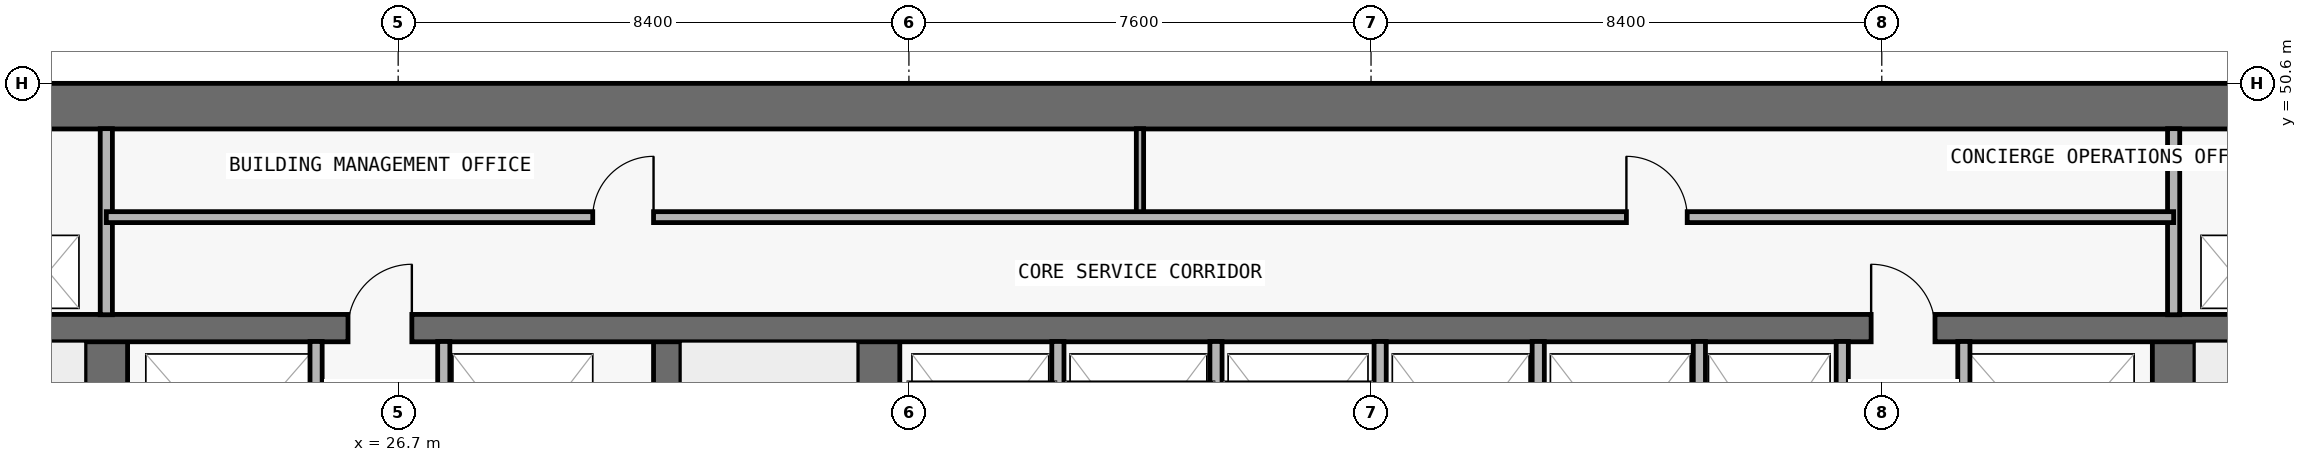
"""IFC4 building model, lengths in metres.
Left out: names, types, materials, properties, quantities, classifications, styles, units other than length and angle.
Written with IfcOpenShell. Run it as: python <this file> out.ifc"""

import sys

from ifc_helpers import new_model, si_unit, direction, frame, frame_2d, origin, place, context, subcontext, project, spatial, rectangle, extrude, element, fill, save


model = new_model("IFC4")
c1 = context("Model", 3, precision=1e-05, world=origin(), true_north=direction((0.0, 1.0)))
c2 = subcontext(c1, "Body", "Model", "MODEL_VIEW")
j1 = project(units=[si_unit("LENGTHUNIT", "METRE"), si_unit("PLANEANGLEUNIT", "RADIAN")], contexts=[c1])
p1 = place(None, origin())
s1 = spatial("IfcSite", under=j1, at=p1, CompositionType="ELEMENT")
p2 = place(p1, origin())
s2 = spatial("IfcBuilding", under=s1, at=p2, CompositionType="ELEMENT")
p3 = place(p2, frame((0.0, 0.0, 91.2)))
s3 = spatial("IfcBuildingStorey", under=s2, at=p3, CompositionType="ELEMENT", Elevation=91.2)
p4 = place(p3, frame((17.85, 50.225, 0.0), z_axis=(0.0, 0.0, 1.0), x_axis=(1.0, 0.0, 0.0)))
e1 = element("IfcWall", 1, at=p4, inside=s3, PredefinedType="SHEAR", context=c2, shape_type="SweptSolid", body=[
    extrude(rectangle(XDim=42.1, YDim=0.75, at=frame_2d((21.05, 0.0))), origin(), (0.0, 0.0, 1.0), 3.05),
])
p5 = place(p3, frame((21.9, 36.95, 0.0), z_axis=(0.0, 0.0, 1.0), x_axis=(0.0, 1.0, 0.0)))
e2 = element("IfcWall", 2, at=p5, inside=s3, PredefinedType="SHEAR", context=c2, shape_type="SweptSolid", body=[
    extrude(rectangle(XDim=9.625, YDim=0.7, at=frame_2d((4.812, 0.0))), origin(), (0.0, 0.0, 1.0), 3.05),
])
p6 = place(p5, frame((0.6, 0.0, 0.0)))
e3 = element("IfcOpeningElement", 3, at=p6, cuts=e2, PredefinedType="OPENING", context=c2, shape_type="SweptSolid", body=[
    extrude(rectangle(XDim=1.1, YDim=2.15, at=frame_2d((0.55, 1.075))), frame((0.0, 0.36, 0.0), z_axis=(0.0, -1.0, 0.0), x_axis=(1.0, 0.0, 0.0)), (0.0, 0.0, 1.0), 0.72),
])
p7 = place(p3, frame((55.9, 36.95, 0.0), z_axis=(0.0, 0.0, 1.0), x_axis=(0.0, 1.0, 0.0)))
e4 = element("IfcWall", 4, at=p7, inside=s3, PredefinedType="SHEAR", context=c2, shape_type="SweptSolid", body=[
    extrude(rectangle(XDim=9.625, YDim=0.7, at=frame_2d((4.812, 0.0))), origin(), (0.0, 0.0, 1.0), 3.05),
])
p8 = place(p7, frame((0.6, 0.0, 0.0)))
e5 = element("IfcOpeningElement", 5, at=p8, cuts=e4, PredefinedType="OPENING", context=c2, shape_type="SweptSolid", body=[
    extrude(rectangle(XDim=1.1, YDim=2.15, at=frame_2d((0.55, 1.075))), frame((0.0, 0.36, 0.0), z_axis=(0.0, -1.0, 0.0), x_axis=(1.0, 0.0, 0.0)), (0.0, 0.0, 1.0), 0.72),
])
p9 = place(p3, frame((31.125, 36.95, 0.0), z_axis=(0.0, 0.0, 1.0), x_axis=(0.0, 1.0, 0.0)))
e6 = element("IfcWall", 6, at=p9, inside=s3, PredefinedType="SHEAR", context=c2, shape_type="SweptSolid", body=[
    extrude(rectangle(XDim=9.625, YDim=0.45, at=frame_2d((4.812, 0.0))), origin(), (0.0, 0.0, 1.0), 3.05),
])
p10 = place(p3, frame((34.6, 36.95, 0.0), z_axis=(0.0, 0.0, 1.0), x_axis=(0.0, 1.0, 0.0)))
e7 = element("IfcWall", 7, at=p10, inside=s3, PredefinedType="SHEAR", context=c2, shape_type="SweptSolid", body=[
    extrude(rectangle(XDim=9.625, YDim=0.7, at=frame_2d((4.812, 0.0))), origin(), (0.0, 0.0, 1.0), 3.05),
])
p11 = place(p3, frame((18.25, 46.575, 0.0), z_axis=(0.0, 0.0, 1.0), x_axis=(1.0, 0.0, 0.0)))
e8 = element("IfcWall", 8, at=p11, inside=s3, PredefinedType="SHEAR", context=c2, shape_type="SweptSolid", body=[
    extrude(rectangle(XDim=41.3, YDim=0.45, at=frame_2d((20.65, 0.0))), origin(), (0.0, 0.0, 1.0), 3.05),
])
p12 = place(p11, frame((7.625, 0.0, 0.0)))
e9 = element("IfcOpeningElement", 9, at=p12, cuts=e8, PredefinedType="OPENING", context=c2, shape_type="SweptSolid", body=[
    extrude(rectangle(XDim=1.05, YDim=2.15, at=frame_2d((0.525, 1.075))), frame((0.0, 0.235, 0.0), z_axis=(0.0, -1.0, 0.0), x_axis=(1.0, 0.0, 0.0)), (0.0, 0.0, 1.0), 0.47),
])
p13 = place(p11, frame((32.675, 0.0, 0.0)))
e10 = element("IfcOpeningElement", 10, at=p13, cuts=e8, PredefinedType="OPENING", context=c2, shape_type="SweptSolid", body=[
    extrude(rectangle(XDim=1.05, YDim=2.15, at=frame_2d((0.525, 1.075))), frame((0.0, 0.235, 0.0), z_axis=(0.0, -1.0, 0.0), x_axis=(1.0, 0.0, 0.0)), (0.0, 0.0, 1.0), 0.47),
])
p14 = place(p3, frame((21.9, 46.795, 0.0), z_axis=(0.0, 0.0, 1.0), x_axis=(0.0, 1.0, 0.0)))
e11 = element("IfcWall", 11, at=p14, inside=s3, PredefinedType="PARTITIONING", context=c2, shape_type="SweptSolid", body=[
    extrude(rectangle(XDim=3.06, YDim=0.2, at=frame_2d((1.53, 0.0))), origin(), (0.0, 0.0, 1.0), 3.05),
])
for number, where, z_axis, x_axis in (
    (12, (25.35, 43.17, 0.0), (0.0, 0.0, 1.0), (0.0, 1.0, 0.0)),
    (13, (27.45, 43.17, 0.0), (0.0, 0.0, 1.0), (0.0, 1.0, 0.0)),
    (14, (37.55, 43.17, 0.0), (0.0, 0.0, 1.0), (0.0, 1.0, 0.0)),
):
    element("IfcWall", number, at=place(p3, frame(where, z_axis=z_axis, x_axis=x_axis)), inside=s3, PredefinedType="PARTITIONING", context=c2, shape_type="SweptSolid", body=[
        extrude(rectangle(XDim=3.185, YDim=0.2, at=frame_2d((1.593, 0.0))), origin(), (0.0, 0.0, 1.0), 3.05),
    ])
p15 = place(p3, frame((38.9, 48.4, 0.0), z_axis=(0.0, 0.0, 1.0), x_axis=(0.0, 1.0, 0.0)))
e15 = element("IfcWall", 15, at=p15, inside=s3, PredefinedType="PARTITIONING", context=c2, shape_type="SweptSolid", body=[
    extrude(rectangle(XDim=1.455, YDim=0.12, at=frame_2d((0.728, 0.0))), origin(), (0.0, 0.0, 1.0), 3.05),
])
for number, where, z_axis, x_axis in (
    (16, (40.15, 43.17, 0.0), (0.0, 0.0, 1.0), (0.0, 1.0, 0.0)),
    (17, (42.85, 43.17, 0.0), (0.0, 0.0, 1.0), (0.0, 1.0, 0.0)),
    (18, (45.45, 43.17, 0.0), (0.0, 0.0, 1.0), (0.0, 1.0, 0.0)),
    (19, (48.1, 43.17, 0.0), (0.0, 0.0, 1.0), (0.0, 1.0, 0.0)),
    (20, (50.45, 43.17, 0.0), (0.0, 0.0, 1.0), (0.0, 1.0, 0.0)),
    (21, (52.45, 43.17, 0.0), (0.0, 0.0, 1.0), (0.0, 1.0, 0.0)),
):
    element("IfcWall", number, at=place(p3, frame(where, z_axis=z_axis, x_axis=x_axis)), inside=s3, PredefinedType="PARTITIONING", context=c2, shape_type="SweptSolid", body=[
        extrude(rectangle(XDim=3.185, YDim=0.2, at=frame_2d((1.593, 0.0))), origin(), (0.0, 0.0, 1.0), 3.05),
    ])
p16 = place(p3, frame((55.9, 46.795, 0.0), z_axis=(0.0, 0.0, 1.0), x_axis=(0.0, 1.0, 0.0)))
e22 = element("IfcWall", 22, at=p16, inside=s3, PredefinedType="PARTITIONING", context=c2, shape_type="SweptSolid", body=[
    extrude(rectangle(XDim=3.06, YDim=0.2, at=frame_2d((1.53, 0.0))), origin(), (0.0, 0.0, 1.0), 3.05),
])
p17 = place(p3, frame((21.9, 48.4, 0.0), z_axis=(0.0, 0.0, 1.0), x_axis=(1.0, 0.0, 0.0)))
e23 = element("IfcWall", 23, at=p17, inside=s3, PredefinedType="PARTITIONING", context=c2, shape_type="SweptSolid", body=[
    extrude(rectangle(XDim=34.0, YDim=0.18, at=frame_2d((17.0, 0.0))), origin(), (0.0, 0.0, 1.0), 3.05),
])
p18 = place(p17, frame((8.0, 0.0, 0.0)))
e24 = element("IfcOpeningElement", 24, at=p18, cuts=e23, PredefinedType="OPENING", context=c2, shape_type="SweptSolid", body=[
    extrude(rectangle(XDim=1.0, YDim=2.2, at=frame_2d((0.5, 1.1))), frame((0.0, 0.1, 0.0), z_axis=(0.0, -1.0, 0.0), x_axis=(1.0, 0.0, 0.0)), (0.0, 0.0, 1.0), 0.2),
])
p19 = place(p17, frame((25.0, 0.0, 0.0)))
e25 = element("IfcOpeningElement", 25, at=p19, cuts=e23, PredefinedType="OPENING", context=c2, shape_type="SweptSolid", body=[
    extrude(rectangle(XDim=1.0, YDim=2.2, at=frame_2d((0.5, 1.1))), frame((0.0, 0.1, 0.0), z_axis=(0.0, -1.0, 0.0), x_axis=(1.0, 0.0, 0.0)), (0.0, 0.0, 1.0), 0.2),
])
p20 = place(p12, origin())
e26 = element("IfcDoor", 26, at=p20, inside=s3, OperationType="SINGLE_SWING_RIGHT", PredefinedType="DOOR", context=c2, shape_type="SweptSolid", body=[
    extrude(rectangle(XDim=1.05, YDim=2.15, at=frame_2d((0.525, 1.075))), frame((0.0, 0.025, 0.0), z_axis=(0.0, -1.0, 0.0), x_axis=(1.0, 0.0, 0.0)), (0.0, 0.0, 1.0), 0.05),
])
fill(e9, e26)
p21 = place(p13, origin())
e27 = element("IfcDoor", 27, at=p21, inside=s3, OperationType="SINGLE_SWING_LEFT", PredefinedType="DOOR", context=c2, shape_type="SweptSolid", body=[
    extrude(rectangle(XDim=1.05, YDim=2.15, at=frame_2d((0.525, 1.075))), frame((0.0, 0.025, 0.0), z_axis=(0.0, -1.0, 0.0), x_axis=(1.0, 0.0, 0.0)), (0.0, 0.0, 1.0), 0.05),
])
fill(e10, e27)
p22 = place(p18, origin())
e28 = element("IfcDoor", 28, at=p22, inside=s3, OperationType="SINGLE_SWING_RIGHT", PredefinedType="DOOR", context=c2, shape_type="SweptSolid", body=[
    extrude(rectangle(XDim=1.0, YDim=2.2, at=frame_2d((0.5, 1.1))), frame((0.0, 0.025, 0.0), z_axis=(0.0, -1.0, 0.0), x_axis=(1.0, 0.0, 0.0)), (0.0, 0.0, 1.0), 0.05),
])
fill(e24, e28)
p23 = place(p19, origin())
e29 = element("IfcDoor", 29, at=p23, inside=s3, OperationType="SINGLE_SWING_LEFT", PredefinedType="DOOR", context=c2, shape_type="SweptSolid", body=[
    extrude(rectangle(XDim=1.0, YDim=2.2, at=frame_2d((0.5, 1.1))), frame((0.0, 0.025, 0.0), z_axis=(0.0, -1.0, 0.0), x_axis=(1.0, 0.0, 0.0)), (0.0, 0.0, 1.0), 0.05),
])
fill(e25, e29)
save(model, sys.argv[1])
